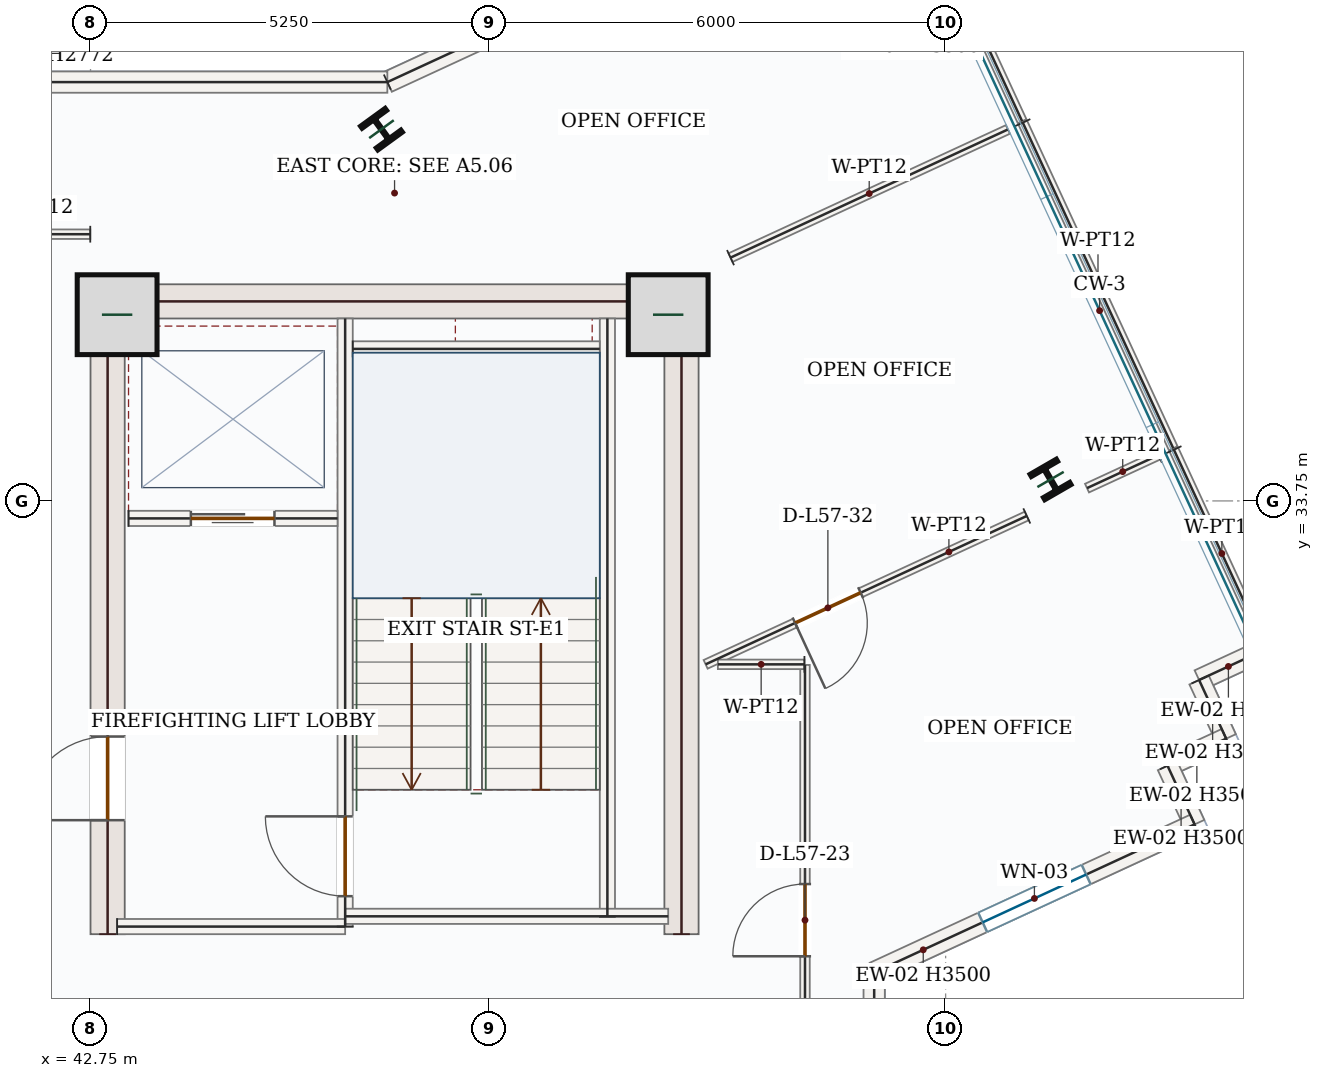
"""IFC4 building model, lengths in metres.
Left out: names, types, materials, properties, quantities, classifications, styles, units other than length and angle.
Written with IfcOpenShell. Run it as: python <this file> out.ifc"""

import sys

from ifc_helpers import new_model, si_unit, direction, frame, frame_2d, origin, origin_2d, place, context, subcontext, project, spatial, rectangle, i_section, extrude, source, transform, mapped, element, fill, save


model = new_model("IFC4")
c1 = context("Model", 3, precision=1e-05, world=origin(), true_north=direction((0.0, 1.0)))
c2 = subcontext(c1, "Body", "Model", "MODEL_VIEW")
j1 = project(units=[si_unit("LENGTHUNIT", "METRE"), si_unit("PLANEANGLEUNIT", "RADIAN")], contexts=[c1])
p1 = place(None, origin())
s1 = spatial("IfcSite", under=j1, at=p1, CompositionType="ELEMENT")
p2 = place(p1, origin())
s2 = spatial("IfcBuilding", under=s1, at=p2, CompositionType="ELEMENT")
p3 = place(p2, frame((0.0, 0.0, 242.85)))
s3 = spatial("IfcBuildingStorey", under=s2, at=p3, CompositionType="ELEMENT", Elevation=242.85)
p4 = place(p3, frame((42.975, 28.05, 0.0), z_axis=(0.0, 0.0, 1.0), x_axis=(0.0, 1.0, 0.0)))
e1 = element("IfcWall", 1, at=p4, inside=s3, PredefinedType="SHEAR", context=c2, shape_type="SweptSolid", body=[
    extrude(rectangle(XDim=8.55, YDim=0.45, at=frame_2d((4.275, 0.0))), origin(), (0.0, 0.0, 1.0), 3.5),
])
p5 = place(p4, frame((1.5, 0.0, 0.0)))
e2 = element("IfcOpeningElement", 2, at=p5, cuts=e1, PredefinedType="OPENING", context=c2, shape_type="SweptSolid", body=[
    extrude(rectangle(XDim=1.1, YDim=2.2, at=frame_2d((0.55, 1.1))), frame((0.0, 0.235, 0.0), z_axis=(0.0, -1.0, 0.0), x_axis=(1.0, 0.0, 0.0)), (0.0, 0.0, 1.0), 0.47),
])
m1 = source(origin(), c2, "Body", "SweptSolid", [
    extrude(rectangle(XDim=8.55, YDim=0.45, at=frame_2d((4.275, 0.0))), origin(), (0.0, 0.0, 1.0), 3.5),
])
p6 = place(p3, frame((50.525, 28.05, 0.0), z_axis=(0.0, 0.0, 1.0), x_axis=(0.0, 1.0, 0.0)))
e3 = element("IfcWall", 3, at=p6, inside=s3, PredefinedType="SHEAR", context=c2, shape_type="MappedRepresentation", body=[
    mapped(m1, transform((0.0, 0.0, 0.0), x_axis=(1.0, 0.0, 0.0), y_axis=(0.0, 1.0, 0.0), z_axis=(0.0, 0.0, 1.0), scale=1.0)),
])
m2 = source(origin(), c2, "Body", "SweptSolid", [
    extrude(rectangle(XDim=7.1, YDim=0.45, at=frame_2d((3.55, 0.0))), origin(), (0.0, 0.0, 1.0), 3.5),
])
p7 = place(p3, frame((43.2, 36.375, 0.0), z_axis=(0.0, 0.0, 1.0), x_axis=(1.0, 0.0, 0.0)))
e4 = element("IfcWall", 4, at=p7, inside=s3, PredefinedType="SHEAR", context=c2, shape_type="MappedRepresentation", body=[
    mapped(m2, transform((0.0, 0.0, 0.0), x_axis=(1.0, 0.0, 0.0), y_axis=(0.0, 1.0, 0.0), z_axis=(0.0, 0.0, 1.0), scale=1.0)),
])
m3 = source(origin(), c2, "Body", "SweptSolid", [
    extrude(rectangle(XDim=1.05, YDim=1.05, at=origin_2d()), origin(), (0.0, 0.0, 1.0), 3.75),
])
for number, where, z_axis, x_axis in (
    (5, (43.1, 36.2, 0.0), (0.0, 0.0, 1.0), (1.0, 0.0, 0.0)),
    (6, (50.35, 36.2, 0.0), (0.0, 0.0, 1.0), (1.0, 0.0, 0.0)),
):
    element("IfcColumn", number, at=place(p3, frame(where, z_axis=z_axis, x_axis=x_axis)), inside=s3, PredefinedType="COLUMN", context=c2, shape_type="MappedRepresentation", body=[
        mapped(m3, transform((0.0, 0.0, 0.0), x_axis=(1.0, 0.0, 0.0), y_axis=(0.0, 1.0, 0.0), z_axis=(0.0, 0.0, 1.0), scale=1.0)),
    ])
m4 = source(origin(), c2, "Body", "SweptSolid", [
    extrude(i_section(OverallWidth=0.399, OverallDepth=0.386, WebThickness=0.021, FlangeThickness=0.033, FilletRadius=0.018, at=origin_2d()), origin(), (0.0, 0.0, 1.0), 3.75),
])
for number, where, z_axis, x_axis in (
    (7, (46.578, 38.641, 0.0), (0.0, 0.0, 1.0), (0.809, 0.588, 0.0)),
    (8, (55.38, 34.032, 0.0), (0.0, 0.0, 1.0), (0.866, 0.5, 0.0)),
):
    element("IfcColumn", number, at=place(p3, frame(where, z_axis=z_axis, x_axis=x_axis)), inside=s3, PredefinedType="COLUMN", context=c2, shape_type="MappedRepresentation", body=[
        mapped(m4, transform((0.0, 0.0, 0.0), x_axis=(1.0, 0.0, 0.0), y_axis=(0.0, 1.0, 0.0), z_axis=(0.0, 0.0, 1.0), scale=1.0)),
    ])
p8 = place(p3, frame((46.655, 39.26, 0.0), z_axis=(0.0, 0.0, 1.0), x_axis=(0.907767275269, 0.419474163627, 0.0)))
e9 = element("IfcWall", 9, at=p8, inside=s3, PredefinedType="SOLIDWALL", context=c2, shape_type="SweptSolid", body=[
    extrude(rectangle(XDim=5.545, YDim=0.28, at=frame_2d((2.772, 0.0))), origin(), (0.0, 0.0, 1.0), 3.5),
])
p9 = place(p8, frame((2.022, 0.0, 0.85)))
e10 = element("IfcOpeningElement", 10, at=p9, cuts=e9, PredefinedType="OPENING", context=c2, shape_type="SweptSolid", body=[
    extrude(rectangle(XDim=1.5, YDim=1.5, at=frame_2d((0.75, 0.75))), frame((0.0, 0.15, 0.0), z_axis=(0.0, -1.0, 0.0), x_axis=(1.0, 0.0, 0.0)), (0.0, 0.0, 1.0), 0.3),
])
m5 = source(origin(), c2, "Body", "SweptSolid", [
    extrude(rectangle(XDim=0.85, YDim=0.28, at=frame_2d((0.425, 0.0))), origin(), (0.0, 0.0, 1.0), 3.5),
])
for number, where, z_axis, x_axis in (
    (11, (58.106, 31.75, 0.0), (0.0, 0.0, 1.0), (-0.908, -0.419, 0.0)),
    (12, (57.334, 31.394, 0.0), (0.0, 0.0, 1.0), (0.419, -0.908, 0.0)),
):
    element("IfcWall", number, at=place(p3, frame(where, z_axis=z_axis, x_axis=x_axis)), inside=s3, PredefinedType="SOLIDWALL", context=c2, shape_type="MappedRepresentation", body=[
        mapped(m5, transform((0.0, 0.0, 0.0), x_axis=(1.0, 0.0, 0.0), y_axis=(0.0, 1.0, 0.0), z_axis=(0.0, 0.0, 1.0), scale=1.0)),
    ])
m6 = source(origin(), c2, "Body", "SweptSolid", [
    extrude(rectangle(XDim=0.85, YDim=0.28, at=frame_2d((0.425, 0.0))), origin(), (0.0, 0.0, 1.0), 3.5),
])
for number, where, z_axis, x_axis in (
    (13, (57.691, 30.622, 0.0), (0.0, 0.0, 1.0), (-0.908, -0.419, 0.0)),
    (14, (56.919, 30.266, 0.0), (0.0, 0.0, 1.0), (0.419, -0.908, 0.0)),
):
    element("IfcWall", number, at=place(p3, frame(where, z_axis=z_axis, x_axis=x_axis)), inside=s3, PredefinedType="SOLIDWALL", context=c2, shape_type="MappedRepresentation", body=[
        mapped(m6, transform((0.0, 0.0, 0.0), x_axis=(1.0, 0.0, 0.0), y_axis=(0.0, 1.0, 0.0), z_axis=(0.0, 0.0, 1.0), scale=1.0)),
    ])
p10 = place(p3, frame((57.276, 29.494, 0.0), z_axis=(0.0, 0.0, 1.0), x_axis=(-0.907756183213, -0.419498166669, 0.0)))
e15 = element("IfcWall", 15, at=p10, inside=s3, PredefinedType="SOLIDWALL", context=c2, shape_type="SweptSolid", body=[
    extrude(rectangle(XDim=4.644, YDim=0.28, at=frame_2d((2.322, 0.0))), origin(), (0.0, 0.0, 1.0), 3.5),
])
p11 = place(p10, frame((1.572, 0.0, 0.85)))
e16 = element("IfcOpeningElement", 16, at=p11, cuts=e15, PredefinedType="OPENING", context=c2, shape_type="SweptSolid", body=[
    extrude(rectangle(XDim=1.5, YDim=1.5, at=frame_2d((0.75, 0.75))), frame((0.0, 0.15, 0.0), z_axis=(0.0, -1.0, 0.0), x_axis=(1.0, 0.0, 0.0)), (0.0, 0.0, 1.0), 0.3),
])
p12 = place(p3, frame((53.06, 27.546, 0.0), z_axis=(0.0, 0.0, 1.0), x_axis=(0.0, -1.0, 0.0)))
e17 = element("IfcWall", 17, at=p12, inside=s3, PredefinedType="SOLIDWALL", context=c2, shape_type="SweptSolid", body=[
    extrude(rectangle(XDim=9.088, YDim=0.28, at=frame_2d((4.544, 0.0))), origin(), (0.0, 0.0, 1.0), 3.5),
])
p13 = place(p12, frame((3.794, 0.0, 0.85)))
e18 = element("IfcOpeningElement", 18, at=p13, cuts=e17, PredefinedType="OPENING", context=c2, shape_type="SweptSolid", body=[
    extrude(rectangle(XDim=1.5, YDim=1.5, at=frame_2d((0.75, 0.75))), frame((0.0, 0.15, 0.0), z_axis=(0.0, -1.0, 0.0), x_axis=(1.0, 0.0, 0.0)), (0.0, 0.0, 1.0), 0.3),
])
m7 = source(origin(), c2, "Body", "SweptSolid", [
    extrude(rectangle(XDim=8.984, YDim=0.28, at=frame_2d((4.492, 0.0))), origin(), (0.0, 0.0, 1.0), 2.772),
])
p14 = place(p3, frame((37.672, 39.26, 0.0), z_axis=(0.0, 0.0, 1.0), x_axis=(1.0, 0.0, 0.0)))
e19 = element("IfcWall", 19, at=p14, inside=s3, PredefinedType="SOLIDWALL", context=c2, shape_type="MappedRepresentation", body=[
    mapped(m7, transform((0.0, 0.0, 0.0), x_axis=(1.0, 0.0, 0.0), y_axis=(0.0, 1.0, 0.0), z_axis=(0.0, 0.0, 1.0), scale=1.0)),
])
m8 = source(origin(), c2, "Body", "SweptSolid", [
    extrude(rectangle(XDim=7.87, YDim=0.2, at=frame_2d((3.935, 0.0))), origin(), (0.0, 0.0, 1.0), 3.5),
])
p15 = place(p3, frame((49.55, 28.28, 0.0), z_axis=(0.0, 0.0, 1.0), x_axis=(0.0, 1.0, 0.0)))
e20 = element("IfcWall", 20, at=p15, inside=s3, PredefinedType="SOLIDWALL", context=c2, shape_type="MappedRepresentation", body=[
    mapped(m8, transform((0.0, 0.0, 0.0), x_axis=(1.0, 0.0, 0.0), y_axis=(0.0, 1.0, 0.0), z_axis=(0.0, 0.0, 1.0), scale=1.0)),
])
p16 = place(p3, frame((46.1, 28.15, 0.0), z_axis=(0.0, 0.0, 1.0), x_axis=(0.0, 1.0, 0.0)))
e21 = element("IfcWall", 21, at=p16, inside=s3, PredefinedType="SOLIDWALL", context=c2, shape_type="SweptSolid", body=[
    extrude(rectangle(XDim=8.0, YDim=0.2, at=frame_2d((4.0, 0.0))), origin(), (0.0, 0.0, 1.0), 3.5),
])
p17 = place(p16, frame((0.4, 0.0, 0.0)))
e22 = element("IfcOpeningElement", 22, at=p17, cuts=e21, PredefinedType="OPENING", context=c2, shape_type="SweptSolid", body=[
    extrude(rectangle(XDim=1.05, YDim=2.15, at=frame_2d((0.525, 1.075))), frame((0.0, 0.11, 0.0), z_axis=(0.0, -1.0, 0.0), x_axis=(1.0, 0.0, 0.0)), (0.0, 0.0, 1.0), 0.22),
])
m9 = source(origin(), c2, "Body", "SweptSolid", [
    extrude(rectangle(XDim=3.0, YDim=0.2, at=frame_2d((1.5, 0.0))), origin(), (0.0, 0.0, 1.0), 3.5),
])
p18 = place(p3, frame((43.1, 28.15, 0.0), z_axis=(0.0, 0.0, 1.0), x_axis=(1.0, 0.0, 0.0)))
e23 = element("IfcWall", 23, at=p18, inside=s3, PredefinedType="SOLIDWALL", context=c2, shape_type="MappedRepresentation", body=[
    mapped(m9, transform((0.0, 0.0, 0.0), x_axis=(1.0, 0.0, 0.0), y_axis=(0.0, 1.0, 0.0), z_axis=(0.0, 0.0, 1.0), scale=1.0)),
])
m10 = source(origin(), c2, "Body", "SweptSolid", [
    extrude(rectangle(XDim=4.25, YDim=0.2, at=frame_2d((2.125, 0.0))), origin(), (0.0, 0.0, 1.0), 3.5),
])
p19 = place(p3, frame((46.1, 28.285, 0.0), z_axis=(0.0, 0.0, 1.0), x_axis=(1.0, 0.0, 0.0)))
e24 = element("IfcWall", 24, at=p19, inside=s3, PredefinedType="SOLIDWALL", context=c2, shape_type="MappedRepresentation", body=[
    mapped(m10, transform((0.0, 0.0, 0.0), x_axis=(1.0, 0.0, 0.0), y_axis=(0.0, 1.0, 0.0), z_axis=(0.0, 0.0, 1.0), scale=1.0)),
])
m11 = source(origin(), c2, "Body", "SweptSolid", [
    extrude(rectangle(XDim=3.25, YDim=0.2, at=frame_2d((1.625, 0.0))), origin(), (0.0, 0.0, 1.0), 3.5),
])
p20 = place(p3, frame((46.2, 35.75, 0.0), z_axis=(0.0, 0.0, 1.0), x_axis=(1.0, 0.0, 0.0)))
e25 = element("IfcWall", 25, at=p20, inside=s3, PredefinedType="SOLIDWALL", context=c2, shape_type="MappedRepresentation", body=[
    mapped(m11, transform((0.0, 0.0, 0.0), x_axis=(1.0, 0.0, 0.0), y_axis=(0.0, 1.0, 0.0), z_axis=(0.0, 0.0, 1.0), scale=1.0)),
])
p21 = place(p3, frame((43.25, 33.52, 0.0), z_axis=(0.0, 0.0, 1.0), x_axis=(1.0, 0.0, 0.0)))
e26 = element("IfcWall", 26, at=p21, inside=s3, PredefinedType="SOLIDWALL", context=c2, shape_type="SweptSolid", body=[
    extrude(rectangle(XDim=2.75, YDim=0.2, at=frame_2d((1.375, 0.0))), origin(), (0.0, 0.0, 1.0), 3.5),
])
p22 = place(p21, frame((0.82, 0.0, 0.0)))
e27 = element("IfcOpeningElement", 27, at=p22, cuts=e26, PredefinedType="OPENING", context=c2, shape_type="SweptSolid", body=[
    extrude(rectangle(XDim=1.1, YDim=2.15, at=frame_2d((0.55, 1.075))), frame((0.0, 0.11, 0.0), z_axis=(0.0, -1.0, 0.0), x_axis=(1.0, 0.0, 0.0)), (0.0, 0.0, 1.0), 0.22),
])
m12 = source(origin(), c2, "Body", "SweptSolid", [
    extrude(rectangle(XDim=4.02, YDim=0.125, at=frame_2d((2.01, 0.0))), origin(), (0.0, 0.0, 1.0), 3.5),
])
p23 = place(p3, frame((51.17, 36.951, 0.0), z_axis=(0.0, 0.0, 1.0), x_axis=(0.907776222313, 0.419454801145, 0.0)))
e28 = element("IfcWall", 28, at=p23, inside=s3, PredefinedType="PARTITIONING", context=c2, shape_type="MappedRepresentation", body=[
    mapped(m12, transform((0.0, 0.0, 0.0), x_axis=(1.0, 0.0, 0.0), y_axis=(0.0, 1.0, 0.0), z_axis=(0.0, 0.0, 1.0), scale=1.0)),
])
m13 = source(origin(), c2, "Body", "SweptSolid", [
    extrude(rectangle(XDim=4.72, YDim=0.125, at=frame_2d((2.36, 0.0))), origin(), (0.0, 0.0, 1.0), 3.5),
])
p24 = place(p3, frame((55.015, 38.727, 0.0), z_axis=(0.0, 0.0, 1.0), x_axis=(0.419422223592, -0.907791274665, 0.0)))
e29 = element("IfcWall", 29, at=p24, inside=s3, PredefinedType="PARTITIONING", context=c2, shape_type="MappedRepresentation", body=[
    mapped(m13, transform((0.0, 0.0, 0.0), x_axis=(1.0, 0.0, 0.0), y_axis=(0.0, 1.0, 0.0), z_axis=(0.0, 0.0, 1.0), scale=1.0)),
])
m14 = source(origin(), c2, "Body", "SweptSolid", [
    extrude(rectangle(XDim=1.034, YDim=0.125, at=frame_2d((0.517, 0.0))), origin(), (0.0, 0.0, 1.0), 3.5),
])
p25 = place(p3, frame((56.799, 34.352, 0.0), z_axis=(0.0, 0.0, 1.0), x_axis=(-0.907786599617, -0.419432342049, 0.0)))
e30 = element("IfcWall", 30, at=p25, inside=s3, PredefinedType="PARTITIONING", context=c2, shape_type="MappedRepresentation", body=[
    mapped(m14, transform((0.0, 0.0, 0.0), x_axis=(1.0, 0.0, 0.0), y_axis=(0.0, 1.0, 0.0), z_axis=(0.0, 0.0, 1.0), scale=1.0)),
])
p26 = place(p3, frame((55.068, 33.552, 0.0), z_axis=(0.0, 0.0, 1.0), x_axis=(-0.90779658515, -0.419410729465, 0.0)))
e31 = element("IfcWall", 31, at=p26, inside=s3, PredefinedType="PARTITIONING", context=c2, shape_type="SweptSolid", body=[
    extrude(rectangle(XDim=4.655, YDim=0.125, at=frame_2d((2.327, 0.0))), origin(), (0.0, 0.0, 1.0), 3.5),
])
p27 = place(p26, frame((2.408, 0.0, 0.0)))
e32 = element("IfcOpeningElement", 32, at=p27, cuts=e31, PredefinedType="OPENING", context=c2, shape_type="SweptSolid", body=[
    extrude(rectangle(XDim=0.95, YDim=2.15, at=frame_2d((0.475, 1.075))), frame((0.0, 0.073, 0.0), z_axis=(0.0, -1.0, 0.0), x_axis=(1.0, 0.0, 0.0)), (0.0, 0.0, 1.0), 0.145),
])
p28 = place(p3, frame((52.15, 22.406, 0.0), z_axis=(0.0, 0.0, 1.0), x_axis=(-2.657666e-05, 0.999999999647, 0.0)))
e33 = element("IfcWall", 33, at=p28, inside=s3, PredefinedType="PARTITIONING", context=c2, shape_type="SweptSolid", body=[
    extrude(rectangle(XDim=9.186, YDim=0.125, at=frame_2d((4.593, 0.0))), origin(), (0.0, 0.0, 1.0), 3.5),
])
p29 = place(p28, frame((5.354, 0.0, 0.0)))
e34 = element("IfcOpeningElement", 34, at=p29, cuts=e33, PredefinedType="OPENING", context=c2, shape_type="SweptSolid", body=[
    extrude(rectangle(XDim=0.95, YDim=2.15, at=frame_2d((0.475, 1.075))), frame((0.0, 0.073, 0.0), z_axis=(0.0, -1.0, 0.0), x_axis=(1.0, 0.0, 0.0)), (0.0, 0.0, 1.0), 0.145),
])
m15 = source(origin(), c2, "Body", "SweptSolid", [
    extrude(rectangle(XDim=1.139, YDim=0.125, at=frame_2d((0.569, 0.0))), origin(), (0.0, 0.0, 1.0), 3.5),
])
p30 = place(p3, frame((52.142, 31.6, 0.0), z_axis=(0.0, 0.0, 1.0), x_axis=(-0.999999908058, 0.000428816427, 0.0)))
e35 = element("IfcWall", 35, at=p30, inside=s3, PredefinedType="PARTITIONING", context=c2, shape_type="MappedRepresentation", body=[
    mapped(m15, transform((0.0, 0.0, 0.0), x_axis=(1.0, 0.0, 0.0), y_axis=(0.0, 1.0, 0.0), z_axis=(0.0, 0.0, 1.0), scale=1.0)),
])
m16 = source(origin(), c2, "Body", "SweptSolid", [
    extrude(rectangle(XDim=3.01, YDim=0.125, at=frame_2d((1.505, 0.0))), origin(), (0.0, 0.0, 1.0), 3.5),
])
p31 = place(p3, frame((57.003, 34.424, 0.0), z_axis=(0.0, 0.0, 1.0), x_axis=(0.419490178077, -0.90775987491, 0.0)))
e36 = element("IfcWall", 36, at=p31, inside=s3, PredefinedType="PARTITIONING", context=c2, shape_type="MappedRepresentation", body=[
    mapped(m16, transform((0.0, 0.0, 0.0), x_axis=(1.0, 0.0, 0.0), y_axis=(0.0, 1.0, 0.0), z_axis=(0.0, 0.0, 1.0), scale=1.0)),
])
p32 = place(p3, frame((42.747, 37.259, 0.0), z_axis=(0.0, 0.0, 1.0), x_axis=(-0.999999916415, 0.000408864141, 0.0)))
e37 = element("IfcWall", 37, at=p32, inside=s3, PredefinedType="PARTITIONING", context=c2, shape_type="SweptSolid", body=[
    extrude(rectangle(XDim=2.986, YDim=0.125, at=frame_2d((1.493, 0.0))), origin(), (0.0, 0.0, 1.0), 3.5),
])
p33 = place(p32, frame((1.588, 0.0, 0.0)))
e38 = element("IfcOpeningElement", 38, at=p33, cuts=e37, PredefinedType="OPENING", context=c2, shape_type="SweptSolid", body=[
    extrude(rectangle(XDim=0.95, YDim=2.15, at=frame_2d((0.475, 1.075))), frame((0.0, 0.073, 0.0), z_axis=(0.0, -1.0, 0.0), x_axis=(1.0, 0.0, 0.0)), (0.0, 0.0, 1.0), 0.145),
])
m17 = source(origin(), c2, "Body", "SweptSolid", [
    extrude(rectangle(XDim=2.39, YDim=0.125, at=frame_2d((1.195, 0.0))), origin(), (0.0, 0.0, 1.0), 3.5),
])
p34 = place(p3, frame((54.004, 40.915, 0.0), z_axis=(0.0, 0.0, 1.0), x_axis=(0.419459790898, -0.907773916688, 0.0)))
e39 = element("IfcWall", 39, at=p34, inside=s3, PredefinedType="PARTITIONING", context=c2, shape_type="MappedRepresentation", body=[
    mapped(m17, transform((0.0, 0.0, 0.0), x_axis=(1.0, 0.0, 0.0), y_axis=(0.0, 1.0, 0.0), z_axis=(0.0, 0.0, 1.0), scale=1.0)),
])
m18 = source(origin(), c2, "Body", "SweptSolid", [
    extrude(rectangle(XDim=1.5, YDim=1.5, at=frame_2d((0.75, 0.75))), frame((0.0, 0.03, 0.0), z_axis=(0.0, -1.0, 0.0), x_axis=(1.0, 0.0, 0.0)), (0.0, 0.0, 1.0), 0.06),
])
p35 = place(p11, origin())
e40 = element("IfcWindow", 40, at=p35, inside=s3, PartitioningType="SINGLE_PANEL", PredefinedType="WINDOW", context=c2, shape_type="MappedRepresentation", body=[
    mapped(m18, transform((0.0, 0.0, 0.0), x_axis=(1.0, 0.0, 0.0), y_axis=(0.0, 1.0, 0.0), z_axis=(0.0, 0.0, 1.0), scale=1.0)),
])
fill(e16, e40)
m19 = source(origin(), c2, "Body", "SweptSolid", [
    extrude(rectangle(XDim=1.05, YDim=2.15, at=frame_2d((0.525, 1.075))), frame((0.0, 0.025, 0.0), z_axis=(0.0, -1.0, 0.0), x_axis=(1.0, 0.0, 0.0)), (0.0, 0.0, 1.0), 0.05),
])
p36 = place(p17, origin())
e41 = element("IfcDoor", 41, at=p36, inside=s3, OperationType="SINGLE_SWING_RIGHT", PredefinedType="DOOR", context=c2, shape_type="MappedRepresentation", body=[
    mapped(m19, transform((0.0, 0.0, 0.0), x_axis=(1.0, 0.0, 0.0), y_axis=(0.0, 1.0, 0.0), z_axis=(0.0, 0.0, 1.0), scale=1.0)),
])
fill(e22, e41)
m20 = source(origin(), c2, "Body", "SweptSolid", [
    extrude(rectangle(XDim=1.1, YDim=2.15, at=frame_2d((0.55, 1.075))), frame((0.0, 0.025, 0.0), z_axis=(0.0, -1.0, 0.0), x_axis=(1.0, 0.0, 0.0)), (0.0, 0.0, 1.0), 0.05),
])
p37 = place(p22, origin())
e42 = element("IfcDoor", 42, at=p37, inside=s3, OperationType="DOUBLE_DOOR_SLIDING", PredefinedType="DOOR", context=c2, shape_type="MappedRepresentation", body=[
    mapped(m20, transform((0.0, 0.0, 0.0), x_axis=(1.0, 0.0, 0.0), y_axis=(0.0, 1.0, 0.0), z_axis=(0.0, 0.0, 1.0), scale=1.0)),
])
fill(e27, e42)
m21 = source(origin(), c2, "Body", "SweptSolid", [
    extrude(rectangle(XDim=1.1, YDim=2.2, at=frame_2d((0.55, 1.1))), frame((0.0, 0.025, 0.0), z_axis=(0.0, -1.0, 0.0), x_axis=(1.0, 0.0, 0.0)), (0.0, 0.0, 1.0), 0.05),
])
p38 = place(p5, origin())
e43 = element("IfcDoor", 43, at=p38, inside=s3, OperationType="SINGLE_SWING_LEFT", PredefinedType="DOOR", context=c2, shape_type="MappedRepresentation", body=[
    mapped(m21, transform((0.0, 0.0, 0.0), x_axis=(1.0, 0.0, 0.0), y_axis=(0.0, 1.0, 0.0), z_axis=(0.0, 0.0, 1.0), scale=1.0)),
])
fill(e2, e43)
m22 = source(origin(), c2, "Body", "SweptSolid", [
    extrude(rectangle(XDim=0.95, YDim=2.15, at=frame_2d((0.475, 1.075))), frame((0.0, 0.025, 0.0), z_axis=(0.0, -1.0, 0.0), x_axis=(1.0, 0.0, 0.0)), (0.0, 0.0, 1.0), 0.05),
])
p39 = place(p29, origin())
e44 = element("IfcDoor", 44, at=p39, inside=s3, OperationType="SINGLE_SWING_LEFT", PredefinedType="DOOR", context=c2, shape_type="MappedRepresentation", body=[
    mapped(m22, transform((0.0, 0.0, 0.0), x_axis=(1.0, 0.0, 0.0), y_axis=(0.0, 1.0, 0.0), z_axis=(0.0, 0.0, 1.0), scale=1.0)),
])
fill(e34, e44)
p40 = place(p27, origin())
e45 = element("IfcDoor", 45, at=p40, inside=s3, OperationType="SINGLE_SWING_RIGHT", PredefinedType="DOOR", context=c2, shape_type="MappedRepresentation", body=[
    mapped(m22, transform((0.0, 0.0, 0.0), x_axis=(1.0, 0.0, 0.0), y_axis=(0.0, 1.0, 0.0), z_axis=(0.0, 0.0, 1.0), scale=1.0)),
])
fill(e32, e45)
save(model, sys.argv[1])
